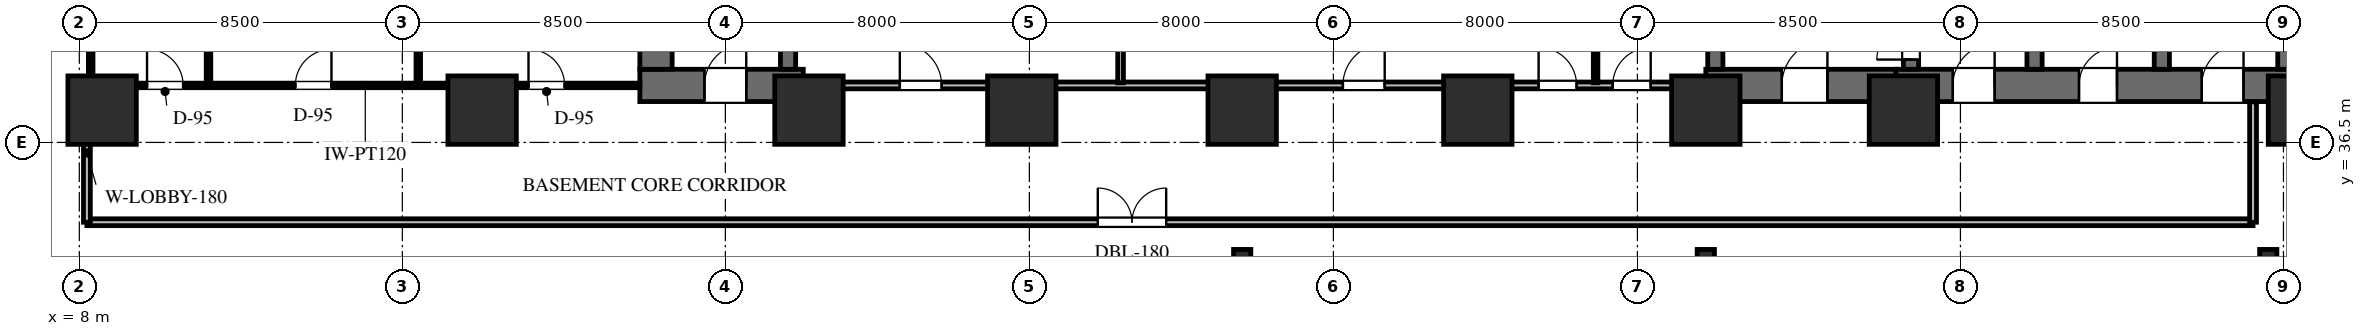
"""IFC4 building model, lengths in metres.
Left out: names, types, materials, properties, quantities, classifications, styles, units other than length and angle.
Written with IfcOpenShell. Run it as: python <this file> out.ifc"""

import sys

from ifc_helpers import new_model, si_unit, direction, frame, frame_2d, origin, origin_2d, place, context, subcontext, project, spatial, rectangle, i_section, extrude, element, fill, save


model = new_model("IFC4")
c1 = context("Model", 3, precision=1e-05, world=origin(), true_north=direction((0.0, 1.0)))
c2 = subcontext(c1, "Body", "Model", "MODEL_VIEW")
j1 = project(units=[si_unit("LENGTHUNIT", "METRE"), si_unit("PLANEANGLEUNIT", "RADIAN")], contexts=[c1])
p1 = place(None, origin())
s1 = spatial("IfcSite", under=j1, at=p1, CompositionType="ELEMENT")
p2 = place(p1, origin())
s2 = spatial("IfcBuilding", under=s1, at=p2, CompositionType="ELEMENT")
p3 = place(p2, frame((0.0, 0.0, -4.2)))
s3 = spatial("IfcBuildingStorey", under=s2, at=p3, CompositionType="ELEMENT", Elevation=-4.2)
p4 = place(p3, frame((55.8, 38.0, 0.0), z_axis=(0.0, 0.0, 1.0), x_axis=(1.0, 0.0, 0.0)))
e1 = element("IfcWall", 1, at=p4, inside=s3, PredefinedType="SHEAR", context=c2, shape_type="SweptSolid", body=[
    extrude(rectangle(XDim=10.9, YDim=0.85, at=frame_2d((5.45, 0.0))), origin(), (0.0, 0.0, 1.0), 4.2),
])
p5 = place(p4, frame((1.5, 0.0, 0.0)))
e2 = element("IfcOpeningElement", 2, at=p5, cuts=e1, PredefinedType="OPENING", context=c2, shape_type="SweptSolid", body=[
    extrude(rectangle(XDim=1.1, YDim=2.2, at=frame_2d((0.55, 1.1))), frame((0.0, 0.435, 0.0), z_axis=(0.0, -1.0, 0.0), x_axis=(1.0, 0.0, 0.0)), (0.0, 0.0, 1.0), 0.87),
])
p6 = place(p4, frame((4.82, 0.0, 0.0)))
e3 = element("IfcOpeningElement", 3, at=p6, cuts=e1, PredefinedType="OPENING", context=c2, shape_type="SweptSolid", body=[
    extrude(rectangle(XDim=1.0, YDim=2.15, at=frame_2d((0.5, 1.075))), frame((0.0, 0.435, 0.0), z_axis=(0.0, -1.0, 0.0), x_axis=(1.0, 0.0, 0.0)), (0.0, 0.0, 1.0), 0.87),
])
p7 = place(p4, frame((8.05, 0.0, 0.0)))
e4 = element("IfcOpeningElement", 4, at=p7, cuts=e1, PredefinedType="OPENING", context=c2, shape_type="SweptSolid", body=[
    extrude(rectangle(XDim=1.1, YDim=2.2, at=frame_2d((0.55, 1.1))), frame((0.0, 0.435, 0.0), z_axis=(0.0, -1.0, 0.0), x_axis=(1.0, 0.0, 0.0)), (0.0, 0.0, 1.0), 0.87),
])
p8 = place(p3, frame((66.275, 38.425, 0.0), z_axis=(0.0, 0.0, 1.0), x_axis=(0.0, 1.0, 0.0)))
e5 = element("IfcWall", 5, at=p8, inside=s3, PredefinedType="SHEAR", context=c2, shape_type="SweptSolid", body=[
    extrude(rectangle(XDim=8.325, YDim=0.85, at=frame_2d((4.163, 0.0))), origin(), (0.0, 0.0, 1.0), 4.2),
])
for number, where, z_axis, x_axis in (
    (6, (62.8, 38.425, 0.0), (0.0, 0.0, 1.0), (0.0, 1.0, 0.0)),
    (7, (59.45, 38.425, 0.0), (0.0, 0.0, 1.0), (0.0, 1.0, 0.0)),
):
    element("IfcWall", number, at=place(p3, frame(where, z_axis=z_axis, x_axis=x_axis)), inside=s3, PredefinedType="SHEAR", context=c2, shape_type="SweptSolid", body=[
        extrude(rectangle(XDim=8.325, YDim=0.4, at=frame_2d((4.163, 0.0))), origin(), (0.0, 0.0, 1.0), 4.2),
    ])
p9 = place(p3, frame((56.2, 38.425, 0.0), z_axis=(0.0, 0.0, 1.0), x_axis=(0.0, 1.0, 0.0)))
e8 = element("IfcWall", 8, at=p9, inside=s3, PredefinedType="SHEAR", context=c2, shape_type="SweptSolid", body=[
    extrude(rectangle(XDim=8.325, YDim=0.4, at=frame_2d((4.163, 0.0))), origin(), (0.0, 0.0, 1.0), 4.2),
])
p10 = place(p9, frame((0.255, 0.0, 0.0)))
e9 = element("IfcOpeningElement", 9, at=p10, cuts=e8, PredefinedType="OPENING", context=c2, shape_type="SweptSolid", body=[
    extrude(rectangle(XDim=0.9, YDim=2.15, at=frame_2d((0.45, 1.075))), frame((0.0, 0.21, 0.0), z_axis=(0.0, -1.0, 0.0), x_axis=(1.0, 0.0, 0.0)), (0.0, 0.0, 1.0), 0.42),
])
p11 = place(p3, frame((50.8, 38.0, 0.0), z_axis=(0.0, 0.0, 1.0), x_axis=(1.0, 0.0, 0.0)))
e10 = element("IfcWall", 10, at=p11, inside=s3, PredefinedType="SHEAR", context=c2, shape_type="SweptSolid", body=[
    extrude(rectangle(XDim=5.0, YDim=0.85, at=frame_2d((2.5, 0.0))), origin(), (0.0, 0.0, 1.0), 4.2),
])
p12 = place(p11, frame((2.0, 0.0, 0.0)))
e11 = element("IfcOpeningElement", 11, at=p12, cuts=e10, PredefinedType="OPENING", context=c2, shape_type="SweptSolid", body=[
    extrude(rectangle(XDim=1.2, YDim=2.2, at=frame_2d((0.6, 1.1))), frame((0.0, 0.435, 0.0), z_axis=(0.0, -1.0, 0.0), x_axis=(1.0, 0.0, 0.0)), (0.0, 0.0, 1.0), 0.87),
])
p13 = place(p3, frame((51.05, 38.425, 0.0), z_axis=(0.0, 0.0, 1.0), x_axis=(0.0, 1.0, 0.0)))
e12 = element("IfcWall", 12, at=p13, inside=s3, PredefinedType="SHEAR", context=c2, shape_type="SweptSolid", body=[
    extrude(rectangle(XDim=8.325, YDim=0.4, at=frame_2d((4.163, 0.0))), origin(), (0.0, 0.0, 1.0), 4.2),
])
p14 = place(p3, frame((22.75, 38.0, 0.0), z_axis=(0.0, 0.0, 1.0), x_axis=(1.0, 0.0, 0.0)))
e13 = element("IfcWall", 13, at=p14, inside=s3, PredefinedType="SHEAR", context=c2, shape_type="SweptSolid", body=[
    extrude(rectangle(XDim=4.3, YDim=0.85, at=frame_2d((2.15, 0.0))), origin(), (0.0, 0.0, 1.0), 4.2),
])
p15 = place(p14, frame((1.7, 0.0, 0.0)))
e14 = element("IfcOpeningElement", 14, at=p15, cuts=e13, PredefinedType="OPENING", context=c2, shape_type="SweptSolid", body=[
    extrude(rectangle(XDim=1.1, YDim=2.2, at=frame_2d((0.55, 1.1))), frame((0.0, 0.435, 0.0), z_axis=(0.0, -1.0, 0.0), x_axis=(1.0, 0.0, 0.0)), (0.0, 0.0, 1.0), 0.87),
])
p16 = place(p3, frame((23.175, 38.425, 0.0), z_axis=(0.0, 0.0, 1.0), x_axis=(0.0, 1.0, 0.0)))
e15 = element("IfcWall", 15, at=p16, inside=s3, PredefinedType="SHEAR", context=c2, shape_type="SweptSolid", body=[
    extrude(rectangle(XDim=8.325, YDim=0.85, at=frame_2d((4.163, 0.0))), origin(), (0.0, 0.0, 1.0), 4.2),
])
p17 = place(p3, frame((26.65, 38.425, 0.0), z_axis=(0.0, 0.0, 1.0), x_axis=(0.0, 1.0, 0.0)))
e16 = element("IfcWall", 16, at=p17, inside=s3, PredefinedType="SHEAR", context=c2, shape_type="SweptSolid", body=[
    extrude(rectangle(XDim=8.325, YDim=0.4, at=frame_2d((4.163, 0.0))), origin(), (0.0, 0.0, 1.0), 4.2),
])
for number, where, z_axis, x_axis in (
    (17, (38.6, 33.4, 0.0), (0.0, 0.0, 1.0), (1.0, 0.0, 0.0)),
    (18, (50.8, 33.4, 0.0), (0.0, 0.0, 1.0), (1.0, 0.0, 0.0)),
    (19, (65.6, 33.4, 0.0), (0.0, 0.0, 1.0), (1.0, 0.0, 0.0)),
):
    element("IfcColumn", number, at=place(p3, frame(where, z_axis=z_axis, x_axis=x_axis)), inside=s3, PredefinedType="COLUMN", context=c2, shape_type="SweptSolid", body=[
        extrude(i_section(OverallWidth=0.454, OverallDepth=0.569, WebThickness=0.078, FlangeThickness=0.125, FilletRadius=0.03, at=origin_2d()), origin(), (0.0, 0.0, 1.0), 4.2),
    ])
for number, where, z_axis, x_axis in (
    (20, (66.5, 37.35, 0.0), (0.0, 0.0, 1.0), (1.0, 0.0, 0.0)),
    (21, (56.0, 37.35, 0.0), (0.0, 0.0, 1.0), (1.0, 0.0, 0.0)),
    (22, (50.8, 37.35, 0.0), (0.0, 0.0, 1.0), (1.0, 0.0, 0.0)),
    (23, (44.8, 37.35, 0.0), (0.0, 0.0, 1.0), (1.0, 0.0, 0.0)),
    (24, (38.6, 37.35, 0.0), (0.0, 0.0, 1.0), (1.0, 0.0, 0.0)),
    (25, (32.8, 37.35, 0.0), (0.0, 0.0, 1.0), (1.0, 0.0, 0.0)),
    (26, (27.2, 37.35, 0.0), (0.0, 0.0, 1.0), (1.0, 0.0, 0.0)),
    (27, (18.6, 37.35, 0.0), (0.0, 0.0, 1.0), (1.0, 0.0, 0.0)),
    (28, (8.6, 37.35, 0.0), (0.0, 0.0, 1.0), (1.0, 0.0, 0.0)),
):
    element("IfcColumn", number, at=place(p3, frame(where, z_axis=z_axis, x_axis=x_axis)), inside=s3, PredefinedType="COLUMN", context=c2, shape_type="SweptSolid", body=[
        extrude(rectangle(XDim=1.8, YDim=1.8, at=origin_2d()), origin(), (0.0, 0.0, 1.0), 4.2),
    ])
p18 = place(p3, frame((45.05, 38.0, 0.0), z_axis=(0.0, 0.0, 1.0), x_axis=(1.0, 0.0, 0.0)))
e29 = element("IfcWall", 29, at=p18, inside=s3, PredefinedType="STANDARD", context=c2, shape_type="SweptSolid", body=[
    extrude(rectangle(XDim=5.75, YDim=0.18, at=frame_2d((2.875, 0.0))), origin(), (0.0, 0.0, 1.0), 2.902),
])
p19 = place(p18, frame((1.35, 0.0, 0.0)))
e30 = element("IfcOpeningElement", 30, at=p19, cuts=e29, PredefinedType="OPENING", context=c2, shape_type="SweptSolid", body=[
    extrude(rectangle(XDim=1.0, YDim=2.15, at=frame_2d((0.5, 1.075))), frame((0.0, 0.1, 0.0), z_axis=(0.0, -1.0, 0.0), x_axis=(1.0, 0.0, 0.0)), (0.0, 0.0, 1.0), 0.2),
])
p20 = place(p18, frame((3.3, 0.0, 0.0)))
e31 = element("IfcOpeningElement", 31, at=p20, cuts=e29, PredefinedType="OPENING", context=c2, shape_type="SweptSolid", body=[
    extrude(rectangle(XDim=1.0, YDim=2.15, at=frame_2d((0.5, 1.075))), frame((0.0, 0.1, 0.0), z_axis=(0.0, -1.0, 0.0), x_axis=(1.0, 0.0, 0.0)), (0.0, 0.0, 1.0), 0.2),
])
p21 = place(p3, frame((47.9, 38.068, 0.0), z_axis=(0.0, 0.0, 1.0), x_axis=(0.0, 1.0, 0.0)))
e32 = element("IfcWall", 32, at=p21, inside=s3, PredefinedType="PARTITIONING", context=c2, shape_type="SweptSolid", body=[
    extrude(rectangle(XDim=5.774, YDim=0.12, at=frame_2d((2.887, 0.0))), origin(), (0.0, 0.0, 1.0), 3.85),
])
p22 = place(p3, frame((27.05, 38.0, 0.0), z_axis=(0.0, 0.0, 1.0), x_axis=(1.0, 0.0, 0.0)))
e33 = element("IfcWall", 33, at=p22, inside=s3, PredefinedType="STANDARD", context=c2, shape_type="SweptSolid", body=[
    extrude(rectangle(XDim=18.0, YDim=0.18, at=frame_2d((9.0, 0.0))), origin(), (0.0, 0.0, 1.0), 2.902),
])
p23 = place(p22, frame((2.541, 0.0, 0.0)))
e34 = element("IfcOpeningElement", 34, at=p23, cuts=e33, PredefinedType="OPENING", context=c2, shape_type="SweptSolid", body=[
    extrude(rectangle(XDim=1.1, YDim=2.2, at=frame_2d((0.55, 1.1))), frame((0.0, 0.1, 0.0), z_axis=(0.0, -1.0, 0.0), x_axis=(1.0, 0.0, 0.0)), (0.0, 0.0, 1.0), 0.2),
])
p24 = place(p22, frame((14.2, 0.0, 0.0)))
e35 = element("IfcOpeningElement", 35, at=p24, cuts=e33, PredefinedType="OPENING", context=c2, shape_type="SweptSolid", body=[
    extrude(rectangle(XDim=1.1, YDim=2.2, at=frame_2d((0.55, 1.1))), frame((0.0, 0.1, 0.0), z_axis=(0.0, -1.0, 0.0), x_axis=(1.0, 0.0, 0.0)), (0.0, 0.0, 1.0), 0.2),
])
p25 = place(p3, frame((35.4, 38.068, 0.0), z_axis=(0.0, 0.0, 1.0), x_axis=(0.0, 1.0, 0.0)))
e36 = element("IfcWall", 36, at=p25, inside=s3, PredefinedType="PARTITIONING", context=c2, shape_type="SweptSolid", body=[
    extrude(rectangle(XDim=5.774, YDim=0.15, at=frame_2d((2.887, 0.0))), origin(), (0.0, 0.0, 1.0), 3.85),
])
p26 = place(p3, frame((8.2, 34.4, 0.0), z_axis=(0.0, 0.0, 1.0), x_axis=(1.0, 0.0, 0.0)))
e37 = element("IfcWall", 37, at=p26, inside=s3, PredefinedType="STANDARD", context=c2, shape_type="SweptSolid", body=[
    extrude(rectangle(XDim=57.0, YDim=0.18, at=frame_2d((28.5, 0.0))), origin(), (0.0, 0.0, 1.0), 2.902),
])
p27 = place(p26, frame((26.6, 0.0, 0.0)))
e38 = element("IfcOpeningElement", 38, at=p27, cuts=e37, PredefinedType="OPENING", context=c2, shape_type="SweptSolid", body=[
    extrude(rectangle(XDim=1.8, YDim=2.2, at=frame_2d((0.9, 1.1))), frame((0.0, 0.1, 0.0), z_axis=(0.0, -1.0, 0.0), x_axis=(1.0, 0.0, 0.0)), (0.0, 0.0, 1.0), 0.2),
])
p28 = place(p3, frame((8.2, 34.4, 0.0), z_axis=(0.0, 0.0, 1.0), x_axis=(0.0, 1.0, 0.0)))
e39 = element("IfcWall", 39, at=p28, inside=s3, PredefinedType="STANDARD", context=c2, shape_type="SweptSolid", body=[
    extrude(rectangle(XDim=3.65, YDim=0.18, at=frame_2d((1.825, 0.0))), origin(), (0.0, 0.0, 1.0), 3.85),
])
p29 = place(p3, frame((65.2, 34.4, 0.0), z_axis=(0.0, 0.0, 1.0), x_axis=(0.0, 1.0, 0.0)))
e40 = element("IfcWall", 40, at=p29, inside=s3, PredefinedType="STANDARD", context=c2, shape_type="SweptSolid", body=[
    extrude(rectangle(XDim=3.167, YDim=0.18, at=frame_2d((1.583, 0.0))), origin(), (0.0, 0.0, 1.0), 2.902),
])
p30 = place(p3, frame((8.3, 38.0, 0.0), z_axis=(0.0, 0.0, 1.0), x_axis=(1.0, 0.0, 0.0)))
e41 = element("IfcWall", 41, at=p30, inside=s3, PredefinedType="PARTITIONING", context=c2, shape_type="SweptSolid", body=[
    extrude(rectangle(XDim=14.45, YDim=0.12, at=frame_2d((7.225, 0.0))), origin(), (0.0, 0.0, 1.0), 2.902),
])
p31 = place(p30, frame((1.482, 0.0, 0.0)))
e42 = element("IfcOpeningElement", 42, at=p31, cuts=e41, PredefinedType="OPENING", context=c2, shape_type="SweptSolid", body=[
    extrude(rectangle(XDim=0.95, YDim=2.15, at=frame_2d((0.475, 1.075))), frame((0.0, 0.07, 0.0), z_axis=(0.0, -1.0, 0.0), x_axis=(1.0, 0.0, 0.0)), (0.0, 0.0, 1.0), 0.14),
])
p32 = place(p30, frame((5.385, 0.0, 0.0)))
e43 = element("IfcOpeningElement", 43, at=p32, cuts=e41, PredefinedType="OPENING", context=c2, shape_type="SweptSolid", body=[
    extrude(rectangle(XDim=0.95, YDim=2.15, at=frame_2d((0.475, 1.075))), frame((0.0, 0.07, 0.0), z_axis=(0.0, -1.0, 0.0), x_axis=(1.0, 0.0, 0.0)), (0.0, 0.0, 1.0), 0.14),
])
p33 = place(p30, frame((11.52, 0.0, 0.0)))
e44 = element("IfcOpeningElement", 44, at=p33, cuts=e41, PredefinedType="OPENING", context=c2, shape_type="SweptSolid", body=[
    extrude(rectangle(XDim=0.95, YDim=2.15, at=frame_2d((0.475, 1.075))), frame((0.0, 0.07, 0.0), z_axis=(0.0, -1.0, 0.0), x_axis=(1.0, 0.0, 0.0)), (0.0, 0.0, 1.0), 0.14),
])
p34 = place(p3, frame((8.3, 38.0, 0.0), z_axis=(0.0, 0.0, 1.0), x_axis=(0.0, 1.0, 0.0)))
e45 = element("IfcWall", 45, at=p34, inside=s3, PredefinedType="PARTITIONING", context=c2, shape_type="SweptSolid", body=[
    extrude(rectangle(XDim=10.8, YDim=0.12, at=frame_2d((5.4, 0.0))), origin(), (0.0, 0.0, 1.0), 2.902),
])
for number, where, z_axis, x_axis in (
    (46, (11.4, 38.068, 0.0), (0.0, 0.0, 1.0), (0.0, 1.0, 0.0)),
    (47, (16.92, 38.068, 0.0), (0.0, 0.0, 1.0), (0.0, 1.0, 0.0)),
):
    element("IfcWall", number, at=place(p3, frame(where, z_axis=z_axis, x_axis=x_axis)), inside=s3, PredefinedType="PARTITIONING", context=c2, shape_type="SweptSolid", body=[
        extrude(rectangle(XDim=10.664, YDim=0.12, at=frame_2d((5.332, 0.0))), origin(), (0.0, 0.0, 1.0), 2.902),
    ])
p35 = place(p5, origin())
e48 = element("IfcDoor", 48, at=p35, inside=s3, OperationType="SINGLE_SWING_RIGHT", PredefinedType="DOOR", context=c2, shape_type="SweptSolid", body=[
    extrude(rectangle(XDim=1.1, YDim=2.2, at=frame_2d((0.55, 1.1))), frame((0.0, 0.025, 0.0), z_axis=(0.0, -1.0, 0.0), x_axis=(1.0, 0.0, 0.0)), (0.0, 0.0, 1.0), 0.05),
])
fill(e2, e48)
p36 = place(p6, origin())
e49 = element("IfcDoor", 49, at=p36, inside=s3, OperationType="SINGLE_SWING_RIGHT", PredefinedType="DOOR", context=c2, shape_type="SweptSolid", body=[
    extrude(rectangle(XDim=1.0, YDim=2.15, at=frame_2d((0.5, 1.075))), frame((0.0, 0.025, 0.0), z_axis=(0.0, -1.0, 0.0), x_axis=(1.0, 0.0, 0.0)), (0.0, 0.0, 1.0), 0.05),
])
fill(e3, e49)
p37 = place(p7, origin())
e50 = element("IfcDoor", 50, at=p37, inside=s3, OperationType="SINGLE_SWING_RIGHT", PredefinedType="DOOR", context=c2, shape_type="SweptSolid", body=[
    extrude(rectangle(XDim=1.1, YDim=2.2, at=frame_2d((0.55, 1.1))), frame((0.0, 0.025, 0.0), z_axis=(0.0, -1.0, 0.0), x_axis=(1.0, 0.0, 0.0)), (0.0, 0.0, 1.0), 0.05),
])
fill(e4, e50)
p38 = place(p12, origin())
e51 = element("IfcDoor", 51, at=p38, inside=s3, OperationType="SINGLE_SWING_RIGHT", PredefinedType="DOOR", context=c2, shape_type="SweptSolid", body=[
    extrude(rectangle(XDim=1.2, YDim=2.2, at=frame_2d((0.6, 1.1))), frame((0.0, 0.025, 0.0), z_axis=(0.0, -1.0, 0.0), x_axis=(1.0, 0.0, 0.0)), (0.0, 0.0, 1.0), 0.05),
])
fill(e11, e51)
p39 = place(p10, origin())
e52 = element("IfcDoor", 52, at=p39, inside=s3, OperationType="SINGLE_SWING_LEFT", PredefinedType="DOOR", context=c2, shape_type="SweptSolid", body=[
    extrude(rectangle(XDim=0.9, YDim=2.15, at=frame_2d((0.45, 1.075))), frame((0.0, 0.025, 0.0), z_axis=(0.0, -1.0, 0.0), x_axis=(1.0, 0.0, 0.0)), (0.0, 0.0, 1.0), 0.05),
])
fill(e9, e52)
p40 = place(p15, origin())
e53 = element("IfcDoor", 53, at=p40, inside=s3, OperationType="SINGLE_SWING_RIGHT", PredefinedType="DOOR", context=c2, shape_type="SweptSolid", body=[
    extrude(rectangle(XDim=1.1, YDim=2.2, at=frame_2d((0.55, 1.1))), frame((0.0, 0.025, 0.0), z_axis=(0.0, -1.0, 0.0), x_axis=(1.0, 0.0, 0.0)), (0.0, 0.0, 1.0), 0.05),
])
fill(e14, e53)
p41 = place(p19, origin())
e54 = element("IfcDoor", 54, at=p41, inside=s3, OperationType="SINGLE_SWING_LEFT", PredefinedType="DOOR", context=c2, shape_type="SweptSolid", body=[
    extrude(rectangle(XDim=1.0, YDim=2.15, at=frame_2d((0.5, 1.075))), frame((0.0, 0.025, 0.0), z_axis=(0.0, -1.0, 0.0), x_axis=(1.0, 0.0, 0.0)), (0.0, 0.0, 1.0), 0.05),
])
fill(e30, e54)
p42 = place(p20, origin())
e55 = element("IfcDoor", 55, at=p42, inside=s3, OperationType="SINGLE_SWING_RIGHT", PredefinedType="DOOR", context=c2, shape_type="SweptSolid", body=[
    extrude(rectangle(XDim=1.0, YDim=2.15, at=frame_2d((0.5, 1.075))), frame((0.0, 0.025, 0.0), z_axis=(0.0, -1.0, 0.0), x_axis=(1.0, 0.0, 0.0)), (0.0, 0.0, 1.0), 0.05),
])
fill(e31, e55)
p43 = place(p23, origin())
e56 = element("IfcDoor", 56, at=p43, inside=s3, OperationType="SINGLE_SWING_LEFT", PredefinedType="DOOR", context=c2, shape_type="SweptSolid", body=[
    extrude(rectangle(XDim=1.1, YDim=2.2, at=frame_2d((0.55, 1.1))), frame((0.0, 0.025, 0.0), z_axis=(0.0, -1.0, 0.0), x_axis=(1.0, 0.0, 0.0)), (0.0, 0.0, 1.0), 0.05),
])
fill(e34, e56)
p44 = place(p24, origin())
e57 = element("IfcDoor", 57, at=p44, inside=s3, OperationType="SINGLE_SWING_RIGHT", PredefinedType="DOOR", context=c2, shape_type="SweptSolid", body=[
    extrude(rectangle(XDim=1.1, YDim=2.2, at=frame_2d((0.55, 1.1))), frame((0.0, 0.025, 0.0), z_axis=(0.0, -1.0, 0.0), x_axis=(1.0, 0.0, 0.0)), (0.0, 0.0, 1.0), 0.05),
])
fill(e35, e57)
p45 = place(p27, origin())
e58 = element("IfcDoor", 58, at=p45, inside=s3, OperationType="DOUBLE_DOOR_SINGLE_SWING", PredefinedType="DOOR", context=c2, shape_type="SweptSolid", body=[
    extrude(rectangle(XDim=1.8, YDim=2.2, at=frame_2d((0.9, 1.1))), frame((0.0, 0.025, 0.0), z_axis=(0.0, -1.0, 0.0), x_axis=(1.0, 0.0, 0.0)), (0.0, 0.0, 1.0), 0.05),
])
fill(e38, e58)
p46 = place(p31, origin())
e59 = element("IfcDoor", 59, at=p46, inside=s3, OperationType="SINGLE_SWING_LEFT", PredefinedType="DOOR", context=c2, shape_type="SweptSolid", body=[
    extrude(rectangle(XDim=0.95, YDim=2.15, at=frame_2d((0.475, 1.075))), frame((0.0, 0.025, 0.0), z_axis=(0.0, -1.0, 0.0), x_axis=(1.0, 0.0, 0.0)), (0.0, 0.0, 1.0), 0.05),
])
fill(e42, e59)
p47 = place(p32, origin())
e60 = element("IfcDoor", 60, at=p47, inside=s3, OperationType="SINGLE_SWING_RIGHT", PredefinedType="DOOR", context=c2, shape_type="SweptSolid", body=[
    extrude(rectangle(XDim=0.95, YDim=2.15, at=frame_2d((0.475, 1.075))), frame((0.0, 0.025, 0.0), z_axis=(0.0, -1.0, 0.0), x_axis=(1.0, 0.0, 0.0)), (0.0, 0.0, 1.0), 0.05),
])
fill(e43, e60)
p48 = place(p33, origin())
e61 = element("IfcDoor", 61, at=p48, inside=s3, OperationType="SINGLE_SWING_LEFT", PredefinedType="DOOR", context=c2, shape_type="SweptSolid", body=[
    extrude(rectangle(XDim=0.95, YDim=2.15, at=frame_2d((0.475, 1.075))), frame((0.0, 0.025, 0.0), z_axis=(0.0, -1.0, 0.0), x_axis=(1.0, 0.0, 0.0)), (0.0, 0.0, 1.0), 0.05),
])
fill(e44, e61)
save(model, sys.argv[1])
